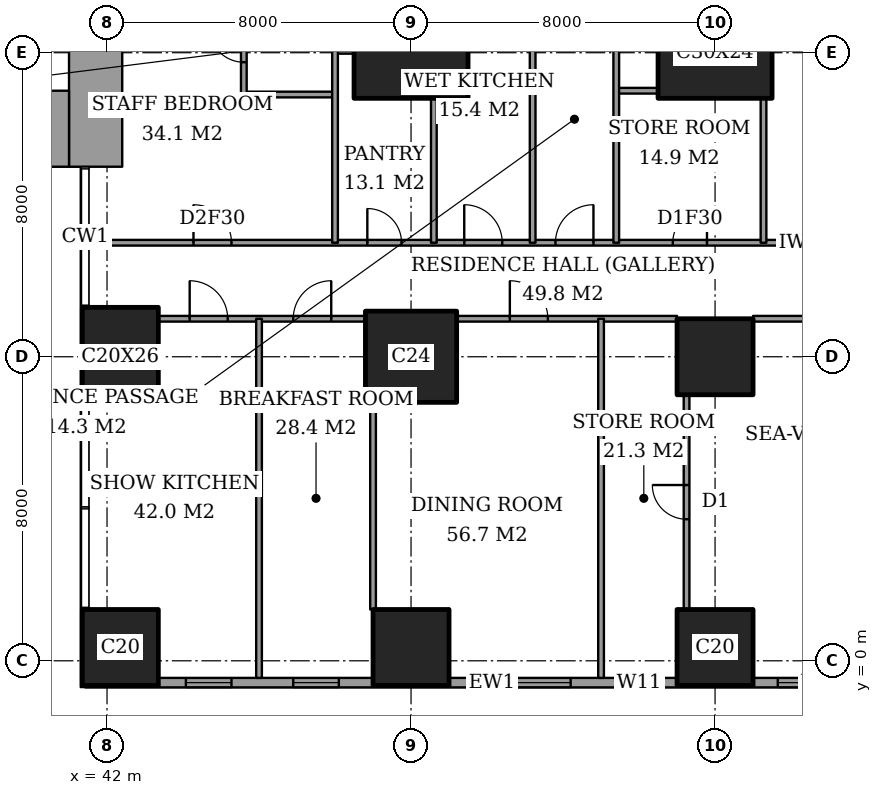
"""IFC4 building model, lengths in metres.
Left out: names, types, materials, properties, quantities, classifications, styles, units other than length and angle.
Written with IfcOpenShell. Run it as: python <this file> out.ifc"""

import sys

from ifc_helpers import new_model, si_unit, direction, frame, frame_2d, origin, origin_2d, place, context, subcontext, project, spatial, rectangle, extrude, element, fill, save


model = new_model("IFC4")
c1 = context("Model", 3, precision=1e-05, world=origin(), true_north=direction((0.0, 1.0)))
c2 = subcontext(c1, "Body", "Model", "MODEL_VIEW")
j1 = project(units=[si_unit("LENGTHUNIT", "METRE"), si_unit("PLANEANGLEUNIT", "RADIAN")], contexts=[c1])
p1 = place(None, origin())
s1 = spatial("IfcSite", under=j1, at=p1, CompositionType="ELEMENT")
p2 = place(p1, origin())
s2 = spatial("IfcBuilding", under=s1, at=p2, CompositionType="ELEMENT")
p3 = place(p2, frame((0.0, 0.0, 164.6)))
s3 = spatial("IfcBuildingStorey", under=s2, at=p3, CompositionType="ELEMENT", Elevation=164.6)
p4 = place(p3, frame((42.35, 0.35, 0.0), z_axis=(0.0, 0.0, 1.0), x_axis=(1.0, 0.0, 0.0)))
e1 = element("IfcColumn", 1, at=p4, inside=s3, PredefinedType="COLUMN", context=c2, shape_type="SweptSolid", body=[
    extrude(rectangle(XDim=2.0, YDim=2.0, at=origin_2d()), origin(), (0.0, 0.0, 1.0), 3.6),
])
p5 = place(p3, frame((42.35, 8.0, 0.0), z_axis=(0.0, 0.0, 1.0), x_axis=(1.0, 0.0, 0.0)))
e2 = element("IfcColumn", 2, at=p5, inside=s3, PredefinedType="COLUMN", context=c2, shape_type="SweptSolid", body=[
    extrude(rectangle(XDim=2.0, YDim=2.6, at=origin_2d()), origin(), (0.0, 0.0, 1.0), 3.6),
])
p6 = place(p3, frame((50.0, 0.35, 0.0), z_axis=(0.0, 0.0, 1.0), x_axis=(1.0, 0.0, 0.0)))
e3 = element("IfcColumn", 3, at=p6, inside=s3, PredefinedType="COLUMN", context=c2, shape_type="SweptSolid", body=[
    extrude(rectangle(XDim=2.0, YDim=2.0, at=origin_2d()), origin(), (0.0, 0.0, 1.0), 3.6),
])
p7 = place(p3, frame((50.0, 8.0, 0.0), z_axis=(0.0, 0.0, 1.0), x_axis=(1.0, 0.0, 0.0)))
e4 = element("IfcColumn", 4, at=p7, inside=s3, PredefinedType="COLUMN", context=c2, shape_type="SweptSolid", body=[
    extrude(rectangle(XDim=2.4, YDim=2.4, at=origin_2d()), origin(), (0.0, 0.0, 1.0), 3.6),
])
p8 = place(p3, frame((50.0, 16.0, 0.0), z_axis=(0.0, 0.0, 1.0), x_axis=(1.0, 0.0, 0.0)))
e5 = element("IfcColumn", 5, at=p8, inside=s3, PredefinedType="COLUMN", context=c2, shape_type="SweptSolid", body=[
    extrude(rectangle(XDim=3.0, YDim=2.4, at=origin_2d()), origin(), (0.0, 0.0, 1.0), 3.6),
])
for number, where, z_axis, x_axis in (
    (6, (58.0, 0.35, 0.0), (0.0, 0.0, 1.0), (1.0, 0.0, 0.0)),
    (7, (58.0, 8.0, 0.0), (0.0, 0.0, 1.0), (1.0, 0.0, 0.0)),
):
    element("IfcColumn", number, at=place(p3, frame(where, z_axis=z_axis, x_axis=x_axis)), inside=s3, PredefinedType="COLUMN", context=c2, shape_type="SweptSolid", body=[
        extrude(rectangle(XDim=2.0, YDim=2.0, at=origin_2d()), origin(), (0.0, 0.0, 1.0), 3.6),
    ])
p9 = place(p3, frame((58.0, 16.0, 0.0), z_axis=(0.0, 0.0, 1.0), x_axis=(1.0, 0.0, 0.0)))
e8 = element("IfcColumn", 8, at=p9, inside=s3, PredefinedType="COLUMN", context=c2, shape_type="SweptSolid", body=[
    extrude(rectangle(XDim=3.0, YDim=2.4, at=origin_2d()), origin(), (0.0, 0.0, 1.0), 3.6),
])
p10 = place(p3, frame((37.85, 14.0, 0.0), z_axis=(0.0, 0.0, 1.0), x_axis=(1.0, 0.0, 0.0)))
e9 = element("IfcWall", 9, at=p10, inside=s3, PredefinedType="SHEAR", context=c2, shape_type="SweptSolid", body=[
    extrude(rectangle(XDim=3.15, YDim=2.0, at=frame_2d((1.575, 0.0))), origin(), (0.0, 0.0, 1.0), 3.6),
])
p11 = place(p3, frame((41.7, 13.0, 0.0), z_axis=(0.0, 0.0, 1.0), x_axis=(0.0, 1.0, 0.0)))
e10 = element("IfcWall", 10, at=p11, inside=s3, PredefinedType="SHEAR", context=c2, shape_type="SweptSolid", body=[
    extrude(rectangle(XDim=11.85, YDim=1.4, at=frame_2d((5.925, 0.0))), origin(), (0.0, 0.0, 1.0), 3.6),
])
p12 = place(p11, frame((7.5, 0.0, 0.0)))
e11 = element("IfcOpeningElement", 11, at=p12, cuts=e10, PredefinedType="OPENING", context=c2, shape_type="SweptSolid", body=[
    extrude(rectangle(XDim=1.8, YDim=2.4, at=frame_2d((0.9, 1.2))), frame((0.0, 0.71, 0.0), z_axis=(0.0, -1.0, 0.0), x_axis=(1.0, 0.0, 0.0)), (0.0, 0.0, 1.0), 1.42),
])
p13 = place(p3, frame((41.425, -0.575, 0.0), z_axis=(0.0, 0.0, 1.0), x_axis=(1.0, 0.0, 0.0)))
e12 = element("IfcWall", 12, at=p13, inside=s3, PredefinedType="SOLIDWALL", context=c2, shape_type="SweptSolid", body=[
    extrude(rectangle(XDim=21.4, YDim=0.25, at=frame_2d((10.7, 0.0))), origin(), (0.0, 0.0, 1.0), 3.6),
])
p14 = place(p13, frame((2.65, 0.0, 0.4)))
e13 = element("IfcOpeningElement", 13, at=p14, cuts=e12, PredefinedType="OPENING", context=c2, shape_type="SweptSolid", body=[
    extrude(rectangle(XDim=1.2, YDim=2.2, at=frame_2d((0.6, 1.1))), frame((0.0, 0.135, 0.0), z_axis=(0.0, -1.0, 0.0), x_axis=(1.0, 0.0, 0.0)), (0.0, 0.0, 1.0), 0.27),
])
p15 = place(p13, frame((5.475, 0.0, 0.4)))
e14 = element("IfcOpeningElement", 14, at=p15, cuts=e12, PredefinedType="OPENING", context=c2, shape_type="SweptSolid", body=[
    extrude(rectangle(XDim=1.2, YDim=2.2, at=frame_2d((0.6, 1.1))), frame((0.0, 0.135, 0.0), z_axis=(0.0, -1.0, 0.0), x_axis=(1.0, 0.0, 0.0)), (0.0, 0.0, 1.0), 0.27),
])
p16 = place(p13, frame((10.375, 0.0, 0.4)))
e15 = element("IfcOpeningElement", 15, at=p16, cuts=e12, PredefinedType="OPENING", context=c2, shape_type="SweptSolid", body=[
    extrude(rectangle(XDim=2.4, YDim=2.2, at=frame_2d((1.2, 1.1))), frame((0.0, 0.135, 0.0), z_axis=(0.0, -1.0, 0.0), x_axis=(1.0, 0.0, 0.0)), (0.0, 0.0, 1.0), 0.27),
])
p17 = place(p13, frame((13.975, 0.0, 0.4)))
e16 = element("IfcOpeningElement", 16, at=p17, cuts=e12, PredefinedType="OPENING", context=c2, shape_type="SweptSolid", body=[
    extrude(rectangle(XDim=1.2, YDim=2.2, at=frame_2d((0.6, 1.1))), frame((0.0, 0.135, 0.0), z_axis=(0.0, -1.0, 0.0), x_axis=(1.0, 0.0, 0.0)), (0.0, 0.0, 1.0), 0.27),
])
p18 = place(p13, frame((18.225, 0.0, 0.4)))
e17 = element("IfcOpeningElement", 17, at=p18, cuts=e12, PredefinedType="OPENING", context=c2, shape_type="SweptSolid", body=[
    extrude(rectangle(XDim=2.4, YDim=2.2, at=frame_2d((1.2, 1.1))), frame((0.0, 0.135, 0.0), z_axis=(0.0, -1.0, 0.0), x_axis=(1.0, 0.0, 0.0)), (0.0, 0.0, 1.0), 0.27),
])
p19 = place(p3, frame((43.35, 9.0, 0.0), z_axis=(0.0, 0.0, 1.0), x_axis=(1.0, 0.0, 0.0)))
e18 = element("IfcWall", 18, at=p19, inside=s3, PredefinedType="PARTITIONING", context=c2, shape_type="SweptSolid", body=[
    extrude(rectangle(XDim=5.45, YDim=0.15, at=frame_2d((2.725, 0.0))), origin(), (0.0, 0.0, 1.0), 3.35),
])
p20 = place(p19, frame((3.55, 0.0, 0.0)))
e19 = element("IfcOpeningElement", 19, at=p20, cuts=e18, PredefinedType="OPENING", context=c2, shape_type="SweptSolid", body=[
    extrude(rectangle(XDim=1.0, YDim=2.1, at=frame_2d((0.5, 1.05))), frame((0.0, 0.085, 0.0), z_axis=(0.0, -1.0, 0.0), x_axis=(1.0, 0.0, 0.0)), (0.0, 0.0, 1.0), 0.17),
])
p21 = place(p19, frame((0.825, 0.0, 0.0)))
e20 = element("IfcOpeningElement", 20, at=p21, cuts=e18, PredefinedType="OPENING", context=c2, shape_type="SweptSolid", body=[
    extrude(rectangle(XDim=1.0, YDim=2.1, at=frame_2d((0.5, 1.05))), frame((0.0, 0.085, 0.0), z_axis=(0.0, -1.0, 0.0), x_axis=(1.0, 0.0, 0.0)), (0.0, 0.0, 1.0), 0.17),
])
p22 = place(p3, frame((51.2, 9.0, 0.0), z_axis=(0.0, 0.0, 1.0), x_axis=(1.0, 0.0, 0.0)))
e21 = element("IfcWall", 21, at=p22, inside=s3, PredefinedType="PARTITIONING", context=c2, shape_type="SweptSolid", body=[
    extrude(rectangle(XDim=5.8, YDim=0.15, at=frame_2d((2.9, 0.0))), origin(), (0.0, 0.0, 1.0), 3.35),
])
p23 = place(p22, frame((1.4, 0.0, 0.0)))
e22 = element("IfcOpeningElement", 22, at=p23, cuts=e21, PredefinedType="OPENING", context=c2, shape_type="SweptSolid", body=[
    extrude(rectangle(XDim=1.0, YDim=2.1, at=frame_2d((0.5, 1.05))), frame((0.0, 0.085, 0.0), z_axis=(0.0, -1.0, 0.0), x_axis=(1.0, 0.0, 0.0)), (0.0, 0.0, 1.0), 0.17),
])
p24 = place(p3, frame((59.0, 9.0, 0.0), z_axis=(0.0, 0.0, 1.0), x_axis=(1.0, 0.0, 0.0)))
e23 = element("IfcWall", 23, at=p24, inside=s3, PredefinedType="PARTITIONING", context=c2, shape_type="SweptSolid", body=[
    extrude(rectangle(XDim=5.65, YDim=0.15, at=frame_2d((2.825, 0.0))), origin(), (0.0, 0.0, 1.0), 3.35),
])
p25 = place(p24, frame((2.325, 0.0, 0.0)))
e24 = element("IfcOpeningElement", 24, at=p25, cuts=e23, PredefinedType="OPENING", context=c2, shape_type="SweptSolid", body=[
    extrude(rectangle(XDim=1.0, YDim=2.1, at=frame_2d((0.5, 1.05))), frame((0.0, 0.085, 0.0), z_axis=(0.0, -1.0, 0.0), x_axis=(1.0, 0.0, 0.0)), (0.0, 0.0, 1.0), 0.17),
])
p26 = place(p3, frame((41.439, 11.0, 0.0), z_axis=(0.0, 0.0, 1.0), x_axis=(1.0, 0.0, 0.0)))
e25 = element("IfcWall", 25, at=p26, inside=s3, PredefinedType="PARTITIONING", context=c2, shape_type="SweptSolid", body=[
    extrude(rectangle(XDim=25.011, YDim=0.15, at=frame_2d((12.505, 0.0))), origin(), (0.0, 0.0, 1.0), 3.35),
])
p27 = place(p26, frame((12.361, 0.0, 0.0)))
e26 = element("IfcOpeningElement", 26, at=p27, cuts=e25, PredefinedType="OPENING", context=c2, shape_type="SweptSolid", body=[
    extrude(rectangle(XDim=1.0, YDim=2.1, at=frame_2d((0.5, 1.05))), frame((0.0, 0.085, 0.0), z_axis=(0.0, -1.0, 0.0), x_axis=(1.0, 0.0, 0.0)), (0.0, 0.0, 1.0), 0.17),
])
p28 = place(p26, frame((20.924, 0.0, 0.0)))
e27 = element("IfcOpeningElement", 27, at=p28, cuts=e25, PredefinedType="OPENING", context=c2, shape_type="SweptSolid", body=[
    extrude(rectangle(XDim=1.0, YDim=2.1, at=frame_2d((0.5, 1.05))), frame((0.0, 0.085, 0.0), z_axis=(0.0, -1.0, 0.0), x_axis=(1.0, 0.0, 0.0)), (0.0, 0.0, 1.0), 0.17),
])
p29 = place(p26, frame((15.448, 0.0, 0.0)))
e28 = element("IfcOpeningElement", 28, at=p29, cuts=e25, PredefinedType="OPENING", context=c2, shape_type="SweptSolid", body=[
    extrude(rectangle(XDim=0.9, YDim=2.1, at=frame_2d((0.45, 1.05))), frame((0.0, 0.085, 0.0), z_axis=(0.0, -1.0, 0.0), x_axis=(1.0, 0.0, 0.0)), (0.0, 0.0, 1.0), 0.17),
])
p30 = place(p26, frame((9.961, 0.0, 0.0)))
e29 = element("IfcOpeningElement", 29, at=p30, cuts=e25, PredefinedType="OPENING", context=c2, shape_type="SweptSolid", body=[
    extrude(rectangle(XDim=1.0, YDim=2.1, at=frame_2d((0.5, 1.05))), frame((0.0, 0.085, 0.0), z_axis=(0.0, -1.0, 0.0), x_axis=(1.0, 0.0, 0.0)), (0.0, 0.0, 1.0), 0.17),
])
p31 = place(p26, frame((7.411, 0.0, 0.0)))
e30 = element("IfcOpeningElement", 30, at=p31, cuts=e25, PredefinedType="OPENING", context=c2, shape_type="SweptSolid", body=[
    extrude(rectangle(XDim=0.9, YDim=2.1, at=frame_2d((0.45, 1.05))), frame((0.0, 0.085, 0.0), z_axis=(0.0, -1.0, 0.0), x_axis=(1.0, 0.0, 0.0)), (0.0, 0.0, 1.0), 0.17),
])
p32 = place(p26, frame((2.836, 0.0, 0.0)))
e31 = element("IfcOpeningElement", 31, at=p32, cuts=e25, PredefinedType="OPENING", context=c2, shape_type="SweptSolid", body=[
    extrude(rectangle(XDim=1.0, YDim=2.1, at=frame_2d((0.5, 1.05))), frame((0.0, 0.085, 0.0), z_axis=(0.0, -1.0, 0.0), x_axis=(1.0, 0.0, 0.0)), (0.0, 0.0, 1.0), 0.17),
])
p33 = place(p3, frame((45.6, 14.9, 0.0), z_axis=(0.0, 0.0, 1.0), x_axis=(1.0, 0.0, 0.0)))
e32 = element("IfcWall", 32, at=p33, inside=s3, PredefinedType="PARTITIONING", context=c2, shape_type="SweptSolid", body=[
    extrude(rectangle(XDim=2.4, YDim=0.15, at=frame_2d((1.2, 0.0))), origin(), (0.0, 0.0, 1.0), 3.35),
])
p34 = place(p3, frame((55.4, 15.0, 0.0), z_axis=(0.0, 0.0, 1.0), x_axis=(1.0, 0.0, 0.0)))
e33 = element("IfcWall", 33, at=p34, inside=s3, PredefinedType="PARTITIONING", context=c2, shape_type="SweptSolid", body=[
    extrude(rectangle(XDim=1.1, YDim=0.15, at=frame_2d((0.55, 0.0))), origin(), (0.0, 0.0, 1.0), 3.35),
])
p35 = place(p3, frame((48.0, 16.05, 0.0), z_axis=(0.0, 0.0, 1.0), x_axis=(1.0, 0.0, 0.0)))
e34 = element("IfcWall", 34, at=p35, inside=s3, PredefinedType="PARTITIONING", context=c2, shape_type="SweptSolid", body=[
    extrude(rectangle(XDim=0.5, YDim=0.15, at=frame_2d((0.25, 0.0))), origin(), (0.0, 0.0, 1.0), 2.634),
])
p36 = place(p3, frame((45.6, 14.9, 0.0), z_axis=(0.0, 0.0, 1.0), x_axis=(0.0, 1.0, 0.0)))
e35 = element("IfcWall", 35, at=p36, inside=s3, PredefinedType="PARTITIONING", context=c2, shape_type="SweptSolid", body=[
    extrude(rectangle(XDim=2.6, YDim=0.15, at=frame_2d((1.3, 0.0))), origin(), (0.0, 0.0, 1.0), 3.35),
])
p37 = place(p36, frame((0.85, 0.0, 0.0)))
e36 = element("IfcOpeningElement", 36, at=p37, cuts=e35, PredefinedType="OPENING", context=c2, shape_type="SweptSolid", body=[
    extrude(rectangle(XDim=0.9, YDim=2.1, at=frame_2d((0.45, 1.05))), frame((0.0, 0.085, 0.0), z_axis=(0.0, -1.0, 0.0), x_axis=(1.0, 0.0, 0.0)), (0.0, 0.0, 1.0), 0.17),
])
p38 = place(p3, frame((46.0, -0.45, 0.0), z_axis=(0.0, 0.0, 1.0), x_axis=(0.0, 1.0, 0.0)))
e37 = element("IfcWall", 37, at=p38, inside=s3, PredefinedType="PARTITIONING", context=c2, shape_type="SweptSolid", body=[
    extrude(rectangle(XDim=9.45, YDim=0.15, at=frame_2d((4.725, 0.0))), origin(), (0.0, 0.0, 1.0), 3.35),
])
p39 = place(p3, frame((48.0, 11.0, 0.0), z_axis=(0.0, 0.0, 1.0), x_axis=(0.0, 1.0, 0.0)))
e38 = element("IfcWall", 38, at=p39, inside=s3, PredefinedType="PARTITIONING", context=c2, shape_type="SweptSolid", body=[
    extrude(rectangle(XDim=6.5, YDim=0.15, at=frame_2d((3.25, 0.0))), origin(), (0.0, 0.0, 1.0), 3.35),
])
p40 = place(p3, frame((49.0, 1.35, 0.0), z_axis=(0.0, 0.0, 1.0), x_axis=(0.0, 1.0, 0.0)))
e39 = element("IfcWall", 39, at=p40, inside=s3, PredefinedType="PARTITIONING", context=c2, shape_type="SweptSolid", body=[
    extrude(rectangle(XDim=5.45, YDim=0.15, at=frame_2d((2.725, 0.0))), origin(), (0.0, 0.0, 1.0), 3.35),
])
p41 = place(p3, frame((50.6, 11.0, 0.0), z_axis=(0.0, 0.0, 1.0), x_axis=(0.0, 1.0, 0.0)))
e40 = element("IfcWall", 40, at=p41, inside=s3, PredefinedType="PARTITIONING", context=c2, shape_type="SweptSolid", body=[
    extrude(rectangle(XDim=3.8, YDim=0.15, at=frame_2d((1.9, 0.0))), origin(), (0.0, 0.0, 1.0), 3.35),
])
p42 = place(p3, frame((53.2, 11.0, 0.0), z_axis=(0.0, 0.0, 1.0), x_axis=(0.0, 1.0, 0.0)))
e41 = element("IfcWall", 41, at=p42, inside=s3, PredefinedType="PARTITIONING", context=c2, shape_type="SweptSolid", body=[
    extrude(rectangle(XDim=6.5, YDim=0.15, at=frame_2d((3.25, 0.0))), origin(), (0.0, 0.0, 1.0), 3.35),
])
p43 = place(p3, frame((55.0, -0.45, 0.0), z_axis=(0.0, 0.0, 1.0), x_axis=(0.0, 1.0, 0.0)))
e42 = element("IfcWall", 42, at=p43, inside=s3, PredefinedType="PARTITIONING", context=c2, shape_type="SweptSolid", body=[
    extrude(rectangle(XDim=9.45, YDim=0.15, at=frame_2d((4.725, 0.0))), origin(), (0.0, 0.0, 1.0), 3.35),
])
p44 = place(p3, frame((55.4, 11.0, 0.0), z_axis=(0.0, 0.0, 1.0), x_axis=(0.0, 1.0, 0.0)))
e43 = element("IfcWall", 43, at=p44, inside=s3, PredefinedType="PARTITIONING", context=c2, shape_type="SweptSolid", body=[
    extrude(rectangle(XDim=10.6, YDim=0.15, at=frame_2d((5.3, 0.0))), origin(), (0.0, 0.0, 1.0), 3.35),
])
p45 = place(p44, frame((8.05, 0.0, 0.0)))
e44 = element("IfcOpeningElement", 44, at=p45, cuts=e43, PredefinedType="OPENING", context=c2, shape_type="SweptSolid", body=[
    extrude(rectangle(XDim=1.0, YDim=2.1, at=frame_2d((0.5, 1.05))), frame((0.0, 0.085, 0.0), z_axis=(0.0, -1.0, 0.0), x_axis=(1.0, 0.0, 0.0)), (0.0, 0.0, 1.0), 0.17),
])
p46 = place(p3, frame((57.25, 1.35, 0.0), z_axis=(0.0, 0.0, 1.0), x_axis=(0.0, 1.0, 0.0)))
e45 = element("IfcWall", 45, at=p46, inside=s3, PredefinedType="PARTITIONING", context=c2, shape_type="SweptSolid", body=[
    extrude(rectangle(XDim=5.65, YDim=0.15, at=frame_2d((2.825, 0.0))), origin(), (0.0, 0.0, 1.0), 3.35),
])
p47 = place(p46, frame((2.375, 0.0, 0.0)))
e46 = element("IfcOpeningElement", 46, at=p47, cuts=e45, PredefinedType="OPENING", context=c2, shape_type="SweptSolid", body=[
    extrude(rectangle(XDim=0.9, YDim=2.1, at=frame_2d((0.45, 1.05))), frame((0.0, 0.085, 0.0), z_axis=(0.0, -1.0, 0.0), x_axis=(1.0, 0.0, 0.0)), (0.0, 0.0, 1.0), 0.17),
])
p48 = place(p3, frame((59.275, 11.0, 0.0), z_axis=(0.0, 0.0, 1.0), x_axis=(0.0, 1.0, 0.0)))
e47 = element("IfcWall", 47, at=p48, inside=s3, PredefinedType="PARTITIONING", context=c2, shape_type="SweptSolid", body=[
    extrude(rectangle(XDim=3.8, YDim=0.15, at=frame_2d((1.9, 0.0))), origin(), (0.0, 0.0, 1.0), 3.35),
])
p49 = place(p14, origin())
e48 = element("IfcWindow", 48, at=p49, inside=s3, PartitioningType="SINGLE_PANEL", PredefinedType="WINDOW", context=c2, shape_type="SweptSolid", body=[
    extrude(rectangle(XDim=1.2, YDim=2.2, at=frame_2d((0.6, 1.1))), frame((0.0, 0.03, 0.0), z_axis=(0.0, -1.0, 0.0), x_axis=(1.0, 0.0, 0.0)), (0.0, 0.0, 1.0), 0.06),
])
fill(e13, e48)
p50 = place(p15, origin())
e49 = element("IfcWindow", 49, at=p50, inside=s3, PartitioningType="SINGLE_PANEL", PredefinedType="WINDOW", context=c2, shape_type="SweptSolid", body=[
    extrude(rectangle(XDim=1.2, YDim=2.2, at=frame_2d((0.6, 1.1))), frame((0.0, 0.03, 0.0), z_axis=(0.0, -1.0, 0.0), x_axis=(1.0, 0.0, 0.0)), (0.0, 0.0, 1.0), 0.06),
])
fill(e14, e49)
p51 = place(p16, origin())
e50 = element("IfcWindow", 50, at=p51, inside=s3, PartitioningType="SINGLE_PANEL", PredefinedType="WINDOW", context=c2, shape_type="SweptSolid", body=[
    extrude(rectangle(XDim=2.4, YDim=2.2, at=frame_2d((1.2, 1.1))), frame((0.0, 0.03, 0.0), z_axis=(0.0, -1.0, 0.0), x_axis=(1.0, 0.0, 0.0)), (0.0, 0.0, 1.0), 0.06),
])
fill(e15, e50)
p52 = place(p17, origin())
e51 = element("IfcWindow", 51, at=p52, inside=s3, PartitioningType="SINGLE_PANEL", PredefinedType="WINDOW", context=c2, shape_type="SweptSolid", body=[
    extrude(rectangle(XDim=1.2, YDim=2.2, at=frame_2d((0.6, 1.1))), frame((0.0, 0.03, 0.0), z_axis=(0.0, -1.0, 0.0), x_axis=(1.0, 0.0, 0.0)), (0.0, 0.0, 1.0), 0.06),
])
fill(e16, e51)
p53 = place(p18, origin())
e52 = element("IfcWindow", 52, at=p53, inside=s3, PartitioningType="SINGLE_PANEL", PredefinedType="WINDOW", context=c2, shape_type="SweptSolid", body=[
    extrude(rectangle(XDim=2.4, YDim=2.2, at=frame_2d((1.2, 1.1))), frame((0.0, 0.03, 0.0), z_axis=(0.0, -1.0, 0.0), x_axis=(1.0, 0.0, 0.0)), (0.0, 0.0, 1.0), 0.06),
])
fill(e17, e52)
p54 = place(p47, origin())
e53 = element("IfcDoor", 53, at=p54, inside=s3, OperationType="SINGLE_SWING_LEFT", PredefinedType="DOOR", context=c2, shape_type="SweptSolid", body=[
    extrude(rectangle(XDim=0.9, YDim=2.1, at=frame_2d((0.45, 1.05))), frame((0.0, 0.025, 0.0), z_axis=(0.0, -1.0, 0.0), x_axis=(1.0, 0.0, 0.0)), (0.0, 0.0, 1.0), 0.05),
])
fill(e46, e53)
p55 = place(p23, origin())
e54 = element("IfcDoor", 54, at=p55, inside=s3, OperationType="SINGLE_SWING_RIGHT", PredefinedType="DOOR", context=c2, shape_type="SweptSolid", body=[
    extrude(rectangle(XDim=1.0, YDim=2.1, at=frame_2d((0.5, 1.05))), frame((0.0, 0.025, 0.0), z_axis=(0.0, -1.0, 0.0), x_axis=(1.0, 0.0, 0.0)), (0.0, 0.0, 1.0), 0.05),
])
fill(e22, e54)
p56 = place(p20, origin())
e55 = element("IfcDoor", 55, at=p56, inside=s3, OperationType="SINGLE_SWING_LEFT", PredefinedType="DOOR", context=c2, shape_type="SweptSolid", body=[
    extrude(rectangle(XDim=1.0, YDim=2.1, at=frame_2d((0.5, 1.05))), frame((0.0, 0.025, 0.0), z_axis=(0.0, -1.0, 0.0), x_axis=(1.0, 0.0, 0.0)), (0.0, 0.0, 1.0), 0.05),
])
fill(e19, e55)
p57 = place(p21, origin())
e56 = element("IfcDoor", 56, at=p57, inside=s3, OperationType="SINGLE_SWING_RIGHT", PredefinedType="DOOR", context=c2, shape_type="SweptSolid", body=[
    extrude(rectangle(XDim=1.0, YDim=2.1, at=frame_2d((0.5, 1.05))), frame((0.0, 0.025, 0.0), z_axis=(0.0, -1.0, 0.0), x_axis=(1.0, 0.0, 0.0)), (0.0, 0.0, 1.0), 0.05),
])
fill(e20, e56)
p58 = place(p27, origin())
e57 = element("IfcDoor", 57, at=p58, inside=s3, OperationType="SINGLE_SWING_LEFT", PredefinedType="DOOR", context=c2, shape_type="SweptSolid", body=[
    extrude(rectangle(XDim=1.0, YDim=2.1, at=frame_2d((0.5, 1.05))), frame((0.0, 0.025, 0.0), z_axis=(0.0, -1.0, 0.0), x_axis=(1.0, 0.0, 0.0)), (0.0, 0.0, 1.0), 0.05),
])
fill(e26, e57)
p59 = place(p29, origin())
e58 = element("IfcDoor", 58, at=p59, inside=s3, OperationType="SINGLE_SWING_LEFT", PredefinedType="DOOR", context=c2, shape_type="SweptSolid", body=[
    extrude(rectangle(XDim=0.9, YDim=2.1, at=frame_2d((0.45, 1.05))), frame((0.0, 0.025, 0.0), z_axis=(0.0, -1.0, 0.0), x_axis=(1.0, 0.0, 0.0)), (0.0, 0.0, 1.0), 0.05),
])
fill(e28, e58)
p60 = place(p30, origin())
e59 = element("IfcDoor", 59, at=p60, inside=s3, OperationType="SINGLE_SWING_RIGHT", PredefinedType="DOOR", context=c2, shape_type="SweptSolid", body=[
    extrude(rectangle(XDim=1.0, YDim=2.1, at=frame_2d((0.5, 1.05))), frame((0.0, 0.025, 0.0), z_axis=(0.0, -1.0, 0.0), x_axis=(1.0, 0.0, 0.0)), (0.0, 0.0, 1.0), 0.05),
])
fill(e29, e59)
p61 = place(p31, origin())
e60 = element("IfcDoor", 60, at=p61, inside=s3, OperationType="SINGLE_SWING_RIGHT", PredefinedType="DOOR", context=c2, shape_type="SweptSolid", body=[
    extrude(rectangle(XDim=0.9, YDim=2.1, at=frame_2d((0.45, 1.05))), frame((0.0, 0.025, 0.0), z_axis=(0.0, -1.0, 0.0), x_axis=(1.0, 0.0, 0.0)), (0.0, 0.0, 1.0), 0.05),
])
fill(e30, e60)
p62 = place(p37, origin())
e61 = element("IfcDoor", 61, at=p62, inside=s3, OperationType="SINGLE_SWING_LEFT", PredefinedType="DOOR", context=c2, shape_type="SweptSolid", body=[
    extrude(rectangle(XDim=0.9, YDim=2.1, at=frame_2d((0.45, 1.05))), frame((0.0, 0.025, 0.0), z_axis=(0.0, -1.0, 0.0), x_axis=(1.0, 0.0, 0.0)), (0.0, 0.0, 1.0), 0.05),
])
fill(e36, e61)
p63 = place(p32, origin())
e62 = element("IfcDoor", 62, at=p63, inside=s3, OperationType="SINGLE_SWING_RIGHT", PredefinedType="DOOR", context=c2, shape_type="SweptSolid", body=[
    extrude(rectangle(XDim=1.0, YDim=2.1, at=frame_2d((0.5, 1.05))), frame((0.0, 0.025, 0.0), z_axis=(0.0, -1.0, 0.0), x_axis=(1.0, 0.0, 0.0)), (0.0, 0.0, 1.0), 0.05),
])
fill(e31, e62)
save(model, sys.argv[1])
